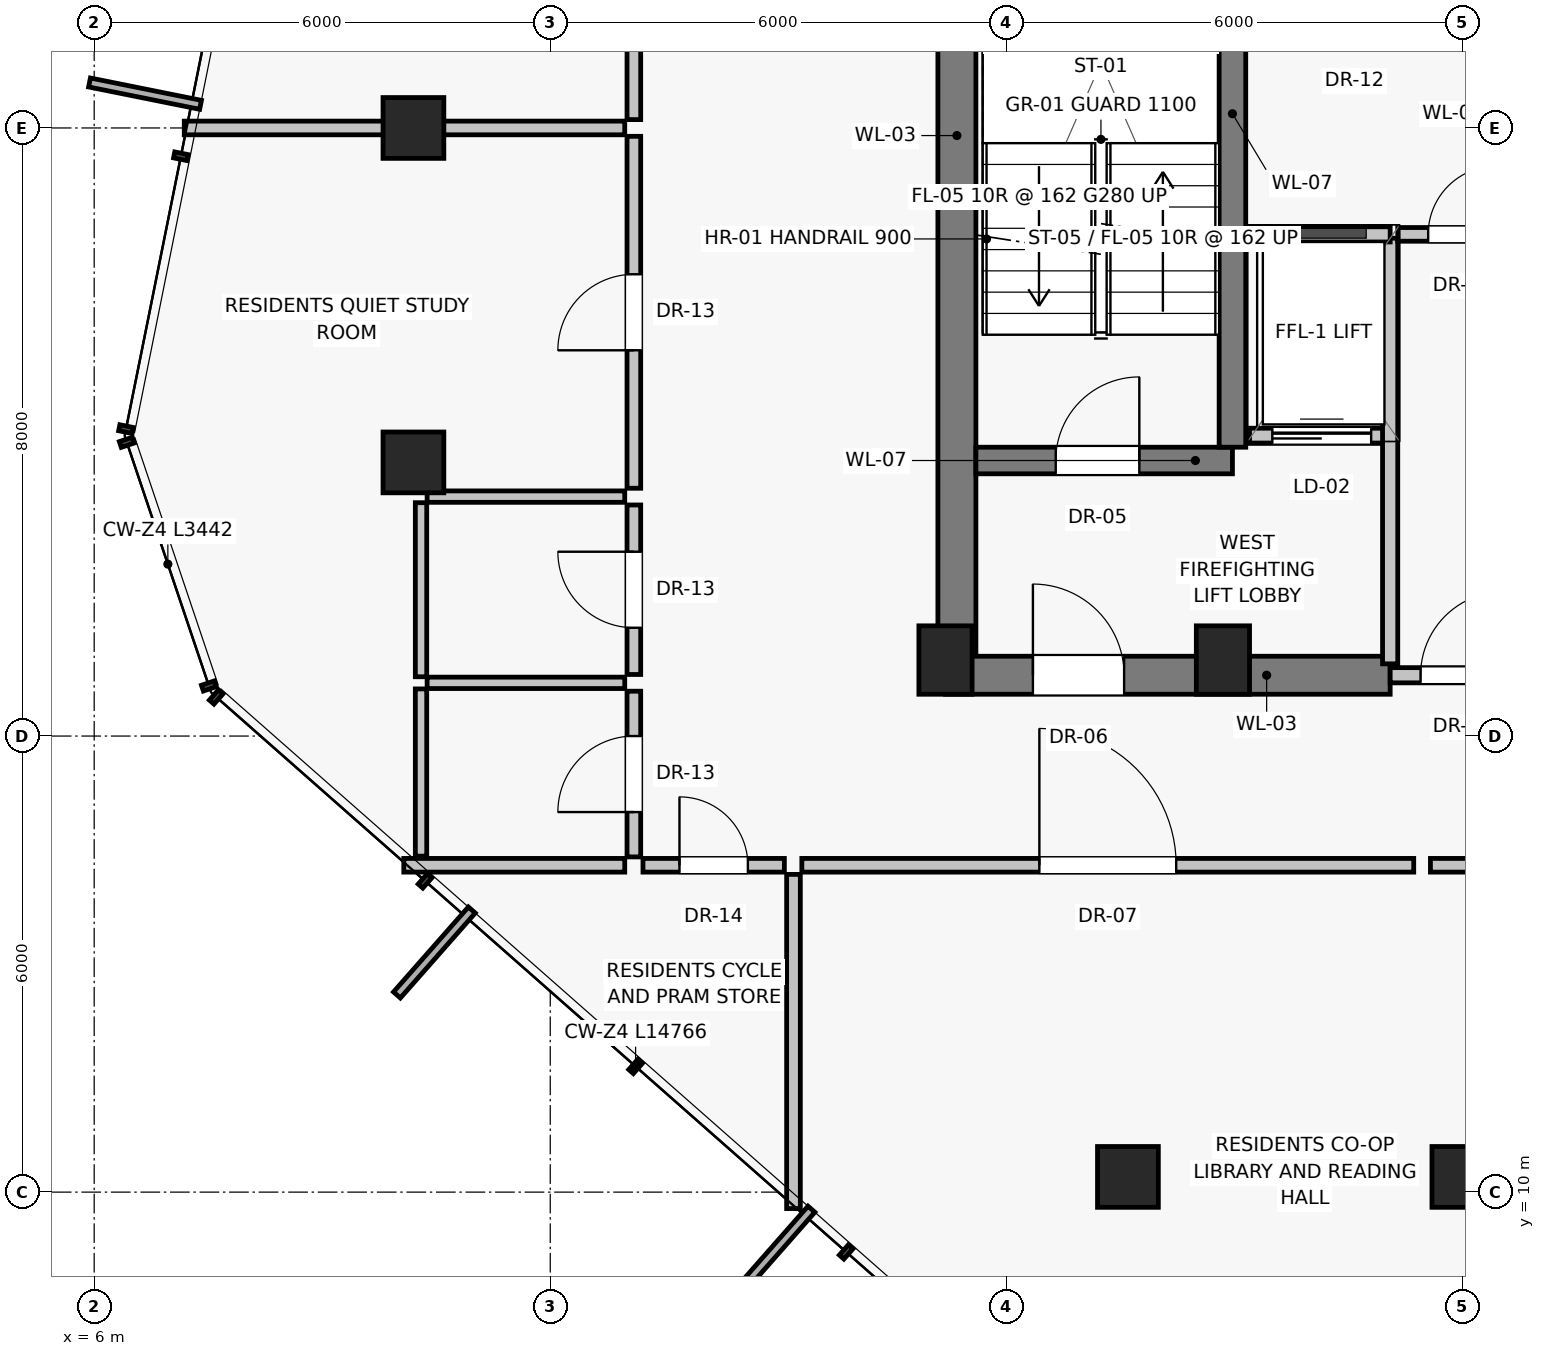
"""IFC4 building model, lengths in metres.
Left out: names, types, materials, properties, quantities, classifications, styles, units other than length and angle.
Written with IfcOpenShell. Run it as: python <this file> out.ifc"""

import sys

from ifc_helpers import new_model, si_unit, direction, frame, frame_2d, origin, origin_2d, place, context, subcontext, project, spatial, rectangle, extrude, source, transform, mapped, element, fill, save


model = new_model("IFC4")
c1 = context("Model", 3, precision=1e-05, world=origin(), true_north=direction((0.0, 1.0)))
c2 = subcontext(c1, "Body", "Model", "MODEL_VIEW")
j1 = project(units=[si_unit("LENGTHUNIT", "METRE"), si_unit("PLANEANGLEUNIT", "RADIAN")], contexts=[c1])
p1 = place(None, origin())
s1 = spatial("IfcSite", under=j1, at=p1, CompositionType="ELEMENT")
p2 = place(p1, origin())
s2 = spatial("IfcBuilding", under=s1, at=p2, CompositionType="ELEMENT")
p3 = place(p2, frame((0.0, 0.0, 248.0)))
s3 = spatial("IfcBuildingStorey", under=s2, at=p3, CompositionType="ELEMENT", Elevation=248.0)
for number, where, z_axis, x_axis in (
    (1, (17.2, 17.0, 0.0), (0.0, 0.0, 1.0), (1.0, 0.0, 0.0)),
    (2, (20.85, 17.0, 0.0), (0.0, 0.0, 1.0), (1.0, 0.0, 0.0)),
):
    element("IfcColumn", number, at=place(p3, frame(where, z_axis=z_axis, x_axis=x_axis)), inside=s3, PredefinedType="PILASTER", context=c2, shape_type="SweptSolid", body=[
        extrude(rectangle(XDim=0.7, YDim=0.9, at=origin_2d()), origin(), (0.0, 0.0, 1.0), 3.25),
    ])
for number, where, z_axis, x_axis in (
    (3, (10.2, 24.0, 0.0), (0.0, 0.0, 1.0), (1.0, 0.0, 0.0)),
    (4, (10.2, 19.6, 0.0), (0.0, 0.0, 1.0), (1.0, 0.0, 0.0)),
    (5, (19.6, 10.2, 0.0), (0.0, 0.0, 1.0), (1.0, 0.0, 0.0)),
    (6, (24.0, 10.2, 0.0), (0.0, 0.0, 1.0), (1.0, 0.0, 0.0)),
):
    element("IfcColumn", number, at=place(p3, frame(where, z_axis=z_axis, x_axis=x_axis)), inside=s3, PredefinedType="COLUMN", context=c2, shape_type="SweptSolid", body=[
        extrude(rectangle(XDim=0.8, YDim=0.8, at=origin_2d()), origin(), (0.0, 0.0, 1.0), 3.25),
    ])
p4 = place(p3, frame((17.35, 16.8, 0.0), z_axis=(0.0, 0.0, 1.0), x_axis=(0.0, 1.0, 0.0)))
e7 = element("IfcWall", 7, at=p4, inside=s3, PredefinedType="SHEAR", context=c2, shape_type="SweptSolid", body=[
    extrude(rectangle(XDim=14.2, YDim=0.5, at=frame_2d((7.1, 0.0))), origin(), (0.0, 0.0, 1.0), 3.015),
])
p5 = place(p3, frame((17.2, 16.8, 0.0), z_axis=(0.0, 0.0, 1.0), x_axis=(1.0, 0.0, 0.0)))
e8 = element("IfcWall", 8, at=p5, inside=s3, PredefinedType="SHEAR", context=c2, shape_type="SweptSolid", body=[
    extrude(rectangle(XDim=5.85, YDim=0.5, at=frame_2d((2.925, 0.0))), origin(), (0.0, 0.0, 1.0), 3.015),
])
p6 = place(p5, frame((1.15, 0.0, 0.0)))
e9 = element("IfcOpeningElement", 9, at=p6, cuts=e8, PredefinedType="OPENING", context=c2, shape_type="SweptSolid", body=[
    extrude(rectangle(XDim=1.2, YDim=2.03, at=frame_2d((0.6, 1.015))), frame((0.0, 0.26, 0.0), z_axis=(0.0, -1.0, 0.0), x_axis=(1.0, 0.0, 0.0)), (0.0, 0.0, 1.0), 0.52),
])
p7 = place(p3, frame((23.05, 16.8, 0.0), z_axis=(0.0, 0.0, 1.0), x_axis=(1.0, 0.0, 0.0)))
e10 = element("IfcWall", 10, at=p7, inside=s3, PredefinedType="SOLIDWALL", context=c2, shape_type="SweptSolid", body=[
    extrude(rectangle(XDim=1.9, YDim=0.2, at=frame_2d((0.95, 0.0))), origin(), (0.0, 0.0, 1.0), 2.165),
])
p8 = place(p7, frame((0.4, 0.0, 0.0)))
e11 = element("IfcOpeningElement", 11, at=p8, cuts=e10, PredefinedType="OPENING", context=c2, shape_type="SweptSolid", body=[
    extrude(rectangle(XDim=1.1, YDim=2.03, at=frame_2d((0.55, 1.015))), frame((0.0, 0.11, 0.0), z_axis=(0.0, -1.0, 0.0), x_axis=(1.0, 0.0, 0.0)), (0.0, 0.0, 1.0), 0.22),
])
p9 = place(p3, frame((17.6, 19.625, 0.0), z_axis=(0.0, 0.0, 1.0), x_axis=(1.0, 0.0, 0.0)))
e12 = element("IfcWall", 12, at=p9, inside=s3, PredefinedType="SHEAR", context=c2, shape_type="SweptSolid", body=[
    extrude(rectangle(XDim=3.375, YDim=0.35, at=frame_2d((1.688, 0.0))), origin(), (0.0, 0.0, 1.0), 3.015),
])
p10 = place(p9, frame((1.05, 0.0, 0.0)))
e13 = element("IfcOpeningElement", 13, at=p10, cuts=e12, PredefinedType="OPENING", context=c2, shape_type="SweptSolid", body=[
    extrude(rectangle(XDim=1.1, YDim=2.03, at=frame_2d((0.55, 1.015))), frame((0.0, 0.185, 0.0), z_axis=(0.0, -1.0, 0.0), x_axis=(1.0, 0.0, 0.0)), (0.0, 0.0, 1.0), 0.37),
])
p11 = place(p3, frame((21.2, 19.95, 0.0), z_axis=(0.0, 0.0, 1.0), x_axis=(1.0, 0.0, 0.0)))
e14 = element("IfcWall", 14, at=p11, inside=s3, PredefinedType="SOLIDWALL", context=c2, shape_type="SweptSolid", body=[
    extrude(rectangle(XDim=1.85, YDim=0.2, at=frame_2d((0.925, 0.0))), origin(), (0.0, 0.0, 1.0), 3.015),
])
p12 = place(p11, frame((0.3, 0.0, 0.0)))
e15 = element("IfcOpeningElement", 15, at=p12, cuts=e14, PredefinedType="OPENING", context=c2, shape_type="SweptSolid", body=[
    extrude(rectangle(XDim=1.3, YDim=2.25, at=frame_2d((0.65, 1.125))), frame((0.0, 0.11, 0.0), z_axis=(0.0, -1.0, 0.0), x_axis=(1.0, 0.0, 0.0)), (0.0, 0.0, 1.0), 0.22),
])
p13 = place(p3, frame((20.975, 19.8, 0.0), z_axis=(0.0, 0.0, 1.0), x_axis=(0.0, 1.0, 0.0)))
e16 = element("IfcWall", 16, at=p13, inside=s3, PredefinedType="SHEAR", context=c2, shape_type="SweptSolid", body=[
    extrude(rectangle(XDim=8.775, YDim=0.35, at=frame_2d((4.387, 0.0))), origin(), (0.0, 0.0, 1.0), 3.015),
])
p14 = place(p3, frame((23.05, 16.95, 0.0), z_axis=(0.0, 0.0, 1.0), x_axis=(0.0, 1.0, 0.0)))
e17 = element("IfcWall", 17, at=p14, inside=s3, PredefinedType="SOLIDWALL", context=c2, shape_type="SweptSolid", body=[
    extrude(rectangle(XDim=5.6, YDim=0.2, at=frame_2d((2.8, 0.0))), origin(), (0.0, 0.0, 1.0), 3.015),
])
p15 = place(p3, frame((21.2, 22.6, 0.0), z_axis=(0.0, 0.0, 1.0), x_axis=(1.0, 0.0, 0.0)))
e18 = element("IfcWall", 18, at=p15, inside=s3, PredefinedType="SOLIDWALL", context=c2, shape_type="SweptSolid", body=[
    extrude(rectangle(XDim=1.85, YDim=0.2, at=frame_2d((0.925, 0.0))), origin(), (0.0, 0.0, 1.0), 3.015),
])
p16 = place(p3, frame((23.15, 22.6, 0.0), z_axis=(0.0, 0.0, 1.0), x_axis=(1.0, 0.0, 0.0)))
e19 = element("IfcWall", 19, at=p16, inside=s3, PredefinedType="PARTITIONING", context=c2, shape_type="SweptSolid", body=[
    extrude(rectangle(XDim=1.7, YDim=0.18, at=frame_2d((0.85, 0.0))), origin(), (0.0, 0.0, 1.0), 3.015),
])
p17 = place(p16, frame((0.4, 0.0, 0.0)))
e20 = element("IfcOpeningElement", 20, at=p17, cuts=e19, PredefinedType="OPENING", context=c2, shape_type="SweptSolid", body=[
    extrude(rectangle(XDim=0.9, YDim=2.01, at=frame_2d((0.45, 1.005))), frame((0.0, 0.1, 0.0), z_axis=(0.0, -1.0, 0.0), x_axis=(1.0, 0.0, 0.0)), (0.0, 0.0, 1.0), 0.2),
])
p18 = place(p3, frame((15.2, 14.18, 0.0), z_axis=(0.0, 0.0, 1.0), x_axis=(0.0, -1.0, 0.0)))
e21 = element("IfcWall", 21, at=p18, inside=s3, PredefinedType="PARTITIONING", context=c2, shape_type="SweptSolid", body=[
    extrude(rectangle(XDim=4.396, YDim=0.18, at=frame_2d((2.198, 0.0))), origin(), (0.0, 0.0, 1.0), 3.015),
])
p19 = place(p3, frame((15.31, 14.3, 0.0), z_axis=(0.0, 0.0, 1.0), x_axis=(1.0, 0.0, 0.0)))
e22 = element("IfcWall", 22, at=p19, inside=s3, PredefinedType="PARTITIONING", context=c2, shape_type="SweptSolid", body=[
    extrude(rectangle(XDim=8.05, YDim=0.18, at=frame_2d((4.025, 0.0))), origin(), (0.0, 0.0, 1.0), 3.015),
])
p20 = place(p19, frame((3.125, 0.0, 0.0)))
e23 = element("IfcOpeningElement", 23, at=p20, cuts=e22, PredefinedType="OPENING", context=c2, shape_type="SweptSolid", body=[
    extrude(rectangle(XDim=1.8, YDim=2.25, at=frame_2d((0.9, 1.125))), frame((0.0, 0.1, 0.0), z_axis=(0.0, -1.0, 0.0), x_axis=(1.0, 0.0, 0.0)), (0.0, 0.0, 1.0), 0.2),
])
p21 = place(p3, frame((23.58, 14.3, 0.0), z_axis=(0.0, 0.0, 1.0), x_axis=(1.0, 0.0, 0.0)))
e24 = element("IfcWall", 24, at=p21, inside=s3, PredefinedType="PARTITIONING", context=c2, shape_type="SweptSolid", body=[
    extrude(rectangle(XDim=7.51, YDim=0.18, at=frame_2d((3.755, 0.0))), origin(), (0.0, 0.0, 1.0), 3.015),
])
p22 = place(p21, frame((3.255, 0.0, 0.0)))
e25 = element("IfcOpeningElement", 25, at=p22, cuts=e24, PredefinedType="OPENING", context=c2, shape_type="SweptSolid", body=[
    extrude(rectangle(XDim=1.0, YDim=2.01, at=frame_2d((0.5, 1.005))), frame((0.0, 0.1, 0.0), z_axis=(0.0, -1.0, 0.0), x_axis=(1.0, 0.0, 0.0)), (0.0, 0.0, 1.0), 0.2),
])
p23 = place(p3, frame((12.98, 14.3, 0.0), z_axis=(0.0, 0.0, 1.0), x_axis=(-1.0, 0.0, 0.0)))
e26 = element("IfcWall", 26, at=p23, inside=s3, PredefinedType="PARTITIONING", context=c2, shape_type="SweptSolid", body=[
    extrude(rectangle(XDim=2.906, YDim=0.18, at=frame_2d((1.453, 0.0))), origin(), (0.0, 0.0, 1.0), 3.015),
])
p24 = place(p3, frame((13.1, 14.41, 0.0), z_axis=(0.0, 0.0, 1.0), x_axis=(0.0, 1.0, 0.0)))
e27 = element("IfcWall", 27, at=p24, inside=s3, PredefinedType="PARTITIONING", context=c2, shape_type="SweptSolid", body=[
    extrude(rectangle(XDim=2.18, YDim=0.18, at=frame_2d((1.09, 0.0))), origin(), (0.0, 0.0, 1.0), 3.015),
])
p25 = place(p24, frame((0.59, 0.0, 0.0)))
e28 = element("IfcOpeningElement", 28, at=p25, cuts=e27, PredefinedType="OPENING", context=c2, shape_type="SweptSolid", body=[
    extrude(rectangle(XDim=1.0, YDim=2.01, at=frame_2d((0.5, 1.005))), frame((0.0, 0.1, 0.0), z_axis=(0.0, -1.0, 0.0), x_axis=(1.0, 0.0, 0.0)), (0.0, 0.0, 1.0), 0.2),
])
p26 = place(p3, frame((13.1, 16.81, 0.0), z_axis=(0.0, 0.0, 1.0), x_axis=(0.0, 1.0, 0.0)))
e29 = element("IfcWall", 29, at=p26, inside=s3, PredefinedType="PARTITIONING", context=c2, shape_type="SweptSolid", body=[
    extrude(rectangle(XDim=2.23, YDim=0.18, at=frame_2d((1.115, 0.0))), origin(), (0.0, 0.0, 1.0), 2.662),
])
p27 = place(p26, frame((0.615, 0.0, 0.0)))
e30 = element("IfcOpeningElement", 30, at=p27, cuts=e29, PredefinedType="OPENING", context=c2, shape_type="SweptSolid", body=[
    extrude(rectangle(XDim=1.0, YDim=2.01, at=frame_2d((0.5, 1.005))), frame((0.0, 0.1, 0.0), z_axis=(0.0, -1.0, 0.0), x_axis=(1.0, 0.0, 0.0)), (0.0, 0.0, 1.0), 0.2),
])
p28 = place(p3, frame((13.1, 19.26, 0.0), z_axis=(0.0, 0.0, 1.0), x_axis=(0.0, 1.0, 0.0)))
e31 = element("IfcWall", 31, at=p28, inside=s3, PredefinedType="PARTITIONING", context=c2, shape_type="SweptSolid", body=[
    extrude(rectangle(XDim=4.63, YDim=0.18, at=frame_2d((2.315, 0.0))), origin(), (0.0, 0.0, 1.0), 2.662),
])
p29 = place(p28, frame((1.815, 0.0, 0.0)))
e32 = element("IfcOpeningElement", 32, at=p29, cuts=e31, PredefinedType="OPENING", context=c2, shape_type="SweptSolid", body=[
    extrude(rectangle(XDim=1.0, YDim=2.01, at=frame_2d((0.5, 1.005))), frame((0.0, 0.1, 0.0), z_axis=(0.0, -1.0, 0.0), x_axis=(1.0, 0.0, 0.0)), (0.0, 0.0, 1.0), 0.2),
])
p30 = place(p3, frame((13.1, 24.11, 0.0), z_axis=(0.0, 0.0, 1.0), x_axis=(0.0, 1.0, 0.0)))
e33 = element("IfcWall", 33, at=p30, inside=s3, PredefinedType="PARTITIONING", context=c2, shape_type="SweptSolid", body=[
    extrude(rectangle(XDim=9.28, YDim=0.18, at=frame_2d((4.64, 0.0))), origin(), (0.0, 0.0, 1.0), 2.662),
])
p31 = place(p30, frame((4.14, 0.0, 0.0)))
e34 = element("IfcOpeningElement", 34, at=p31, cuts=e33, PredefinedType="OPENING", context=c2, shape_type="SweptSolid", body=[
    extrude(rectangle(XDim=1.0, YDim=2.01, at=frame_2d((0.5, 1.005))), frame((0.0, 0.1, 0.0), z_axis=(0.0, -1.0, 0.0), x_axis=(1.0, 0.0, 0.0)), (0.0, 0.0, 1.0), 0.2),
])
for number, where, z_axis, x_axis in (
    (35, (12.98, 16.7, 0.0), (0.0, 0.0, 1.0), (-1.0, 0.0, 0.0)),
    (36, (12.98, 19.15, 0.0), (0.0, 0.0, 1.0), (-1.0, 0.0, 0.0)),
):
    element("IfcWall", number, at=place(p3, frame(where, z_axis=z_axis, x_axis=x_axis)), inside=s3, PredefinedType="PARTITIONING", context=c2, shape_type="SweptSolid", body=[
        extrude(rectangle(XDim=2.6, YDim=0.15, at=frame_2d((1.3, 0.0))), origin(), (0.0, 0.0, 1.0), 3.015),
    ])
p32 = place(p3, frame((10.3, 14.42, 0.0), z_axis=(0.0, 0.0, 1.0), x_axis=(0.0, 1.0, 0.0)))
e37 = element("IfcWall", 37, at=p32, inside=s3, PredefinedType="PARTITIONING", context=c2, shape_type="SweptSolid", body=[
    extrude(rectangle(XDim=2.2, YDim=0.15, at=frame_2d((1.1, 0.0))), origin(), (0.0, 0.0, 1.0), 3.015),
])
p33 = place(p3, frame((10.3, 16.78, 0.0), z_axis=(0.0, 0.0, 1.0), x_axis=(0.0, 1.0, 0.0)))
e38 = element("IfcWall", 38, at=p33, inside=s3, PredefinedType="PARTITIONING", context=c2, shape_type="SweptSolid", body=[
    extrude(rectangle(XDim=2.29, YDim=0.15, at=frame_2d((1.145, 0.0))), origin(), (0.0, 0.0, 1.0), 3.015),
])
p34 = place(p3, frame((12.98, 24.0, 0.0), z_axis=(0.0, 0.0, 1.0), x_axis=(-1.0, 0.0, 0.0)))
e39 = element("IfcWall", 39, at=p34, inside=s3, PredefinedType="PARTITIONING", context=c2, shape_type="SweptSolid", body=[
    extrude(rectangle(XDim=5.795, YDim=0.18, at=frame_2d((2.897, 0.0))), origin(), (0.0, 0.0, 1.0), 3.015),
])
p35 = place(p3, frame((13.22, 14.3, 0.0), z_axis=(0.0, 0.0, 1.0), x_axis=(1.0, 0.0, 0.0)))
e40 = element("IfcWall", 40, at=p35, inside=s3, PredefinedType="PARTITIONING", context=c2, shape_type="SweptSolid", body=[
    extrude(rectangle(XDim=1.86, YDim=0.18, at=frame_2d((0.93, 0.0))), origin(), (0.0, 0.0, 1.0), 3.015),
])
p36 = place(p35, frame((0.48, 0.0, 0.0)))
e41 = element("IfcOpeningElement", 41, at=p36, cuts=e40, PredefinedType="OPENING", context=c2, shape_type="SweptSolid", body=[
    extrude(rectangle(XDim=0.9, YDim=2.01, at=frame_2d((0.45, 1.005))), frame((0.0, 0.1, 0.0), z_axis=(0.0, -1.0, 0.0), x_axis=(1.0, 0.0, 0.0)), (0.0, 0.0, 1.0), 0.2),
])
m1 = source(origin(), c2, "Body", "SweptSolid", [
    extrude(rectangle(XDim=1.2, YDim=2.03, at=frame_2d((0.6, 1.015))), frame((0.0, 0.025, 0.0), z_axis=(0.0, -1.0, 0.0), x_axis=(1.0, 0.0, 0.0)), (0.0, 0.0, 1.0), 0.05),
])
p37 = place(p6, origin())
e42 = element("IfcDoor", 42, at=p37, inside=s3, OperationType="SINGLE_SWING_LEFT", PredefinedType="DOOR", context=c2, shape_type="MappedRepresentation", body=[
    mapped(m1, transform((0.0, 0.0, 0.0), scale=1.0)),
])
fill(e9, e42)
m2 = source(origin(), c2, "Body", "SweptSolid", [
    extrude(rectangle(XDim=1.1, YDim=2.03, at=frame_2d((0.55, 1.015))), frame((0.0, 0.025, 0.0), z_axis=(0.0, -1.0, 0.0), x_axis=(1.0, 0.0, 0.0)), (0.0, 0.0, 1.0), 0.05),
])
p38 = place(p8, origin())
e43 = element("IfcDoor", 43, at=p38, inside=s3, OperationType="SINGLE_SWING_RIGHT", PredefinedType="DOOR", context=c2, shape_type="MappedRepresentation", body=[
    mapped(m2, transform((0.0, 0.0, 0.0), scale=1.0)),
])
fill(e11, e43)
p39 = place(p10, origin())
e44 = element("IfcDoor", 44, at=p39, inside=s3, OperationType="SINGLE_SWING_RIGHT", PredefinedType="DOOR", context=c2, shape_type="MappedRepresentation", body=[
    mapped(m2, transform((0.0, 0.0, 0.0), scale=1.0)),
])
fill(e13, e44)
m3 = source(origin(), c2, "Body", "SweptSolid", [
    extrude(rectangle(XDim=1.3, YDim=2.25, at=frame_2d((0.65, 1.125))), frame((0.0, 0.025, 0.0), z_axis=(0.0, -1.0, 0.0), x_axis=(1.0, 0.0, 0.0)), (0.0, 0.0, 1.0), 0.05),
])
p40 = place(p12, origin())
e45 = element("IfcDoor", 45, at=p40, inside=s3, OperationType="SLIDING_TO_LEFT", PredefinedType="DOOR", context=c2, shape_type="MappedRepresentation", body=[
    mapped(m3, transform((0.0, 0.0, 0.0), scale=1.0)),
])
fill(e15, e45)
m4 = source(origin(), c2, "Body", "SweptSolid", [
    extrude(rectangle(XDim=0.9, YDim=2.01, at=frame_2d((0.45, 1.005))), frame((0.0, 0.025, 0.0), z_axis=(0.0, -1.0, 0.0), x_axis=(1.0, 0.0, 0.0)), (0.0, 0.0, 1.0), 0.05),
])
p41 = place(p17, origin())
e46 = element("IfcDoor", 46, at=p41, inside=s3, OperationType="SINGLE_SWING_RIGHT", PredefinedType="DOOR", context=c2, shape_type="MappedRepresentation", body=[
    mapped(m4, transform((0.0, 0.0, 0.0), scale=1.0)),
])
fill(e20, e46)
m5 = source(origin(), c2, "Body", "SweptSolid", [
    extrude(rectangle(XDim=1.8, YDim=2.25, at=frame_2d((0.9, 1.125))), frame((0.0, 0.025, 0.0), z_axis=(0.0, -1.0, 0.0), x_axis=(1.0, 0.0, 0.0)), (0.0, 0.0, 1.0), 0.05),
])
p42 = place(p20, origin())
e47 = element("IfcDoor", 47, at=p42, inside=s3, OperationType="SINGLE_SWING_LEFT", PredefinedType="DOOR", context=c2, shape_type="MappedRepresentation", body=[
    mapped(m5, transform((0.0, 0.0, 0.0), scale=1.0)),
])
fill(e23, e47)
m6 = source(origin(), c2, "Body", "SweptSolid", [
    extrude(rectangle(XDim=1.0, YDim=2.01, at=frame_2d((0.5, 1.005))), frame((0.0, 0.025, 0.0), z_axis=(0.0, -1.0, 0.0), x_axis=(1.0, 0.0, 0.0)), (0.0, 0.0, 1.0), 0.05),
])
p43 = place(p25, origin())
e48 = element("IfcDoor", 48, at=p43, inside=s3, OperationType="SINGLE_SWING_LEFT", PredefinedType="DOOR", context=c2, shape_type="MappedRepresentation", body=[
    mapped(m6, transform((0.0, 0.0, 0.0), scale=1.0)),
])
fill(e28, e48)
p44 = place(p27, origin())
e49 = element("IfcDoor", 49, at=p44, inside=s3, OperationType="SINGLE_SWING_RIGHT", PredefinedType="DOOR", context=c2, shape_type="MappedRepresentation", body=[
    mapped(m6, transform((0.0, 0.0, 0.0), scale=1.0)),
])
fill(e30, e49)
p45 = place(p29, origin())
e50 = element("IfcDoor", 50, at=p45, inside=s3, OperationType="SINGLE_SWING_LEFT", PredefinedType="DOOR", context=c2, shape_type="MappedRepresentation", body=[
    mapped(m6, transform((0.0, 0.0, 0.0), scale=1.0)),
])
fill(e32, e50)
p46 = place(p36, origin())
e51 = element("IfcDoor", 51, at=p46, inside=s3, OperationType="SINGLE_SWING_LEFT", PredefinedType="DOOR", context=c2, shape_type="MappedRepresentation", body=[
    mapped(m4, transform((0.0, 0.0, 0.0), scale=1.0)),
])
fill(e41, e51)
save(model, sys.argv[1])
